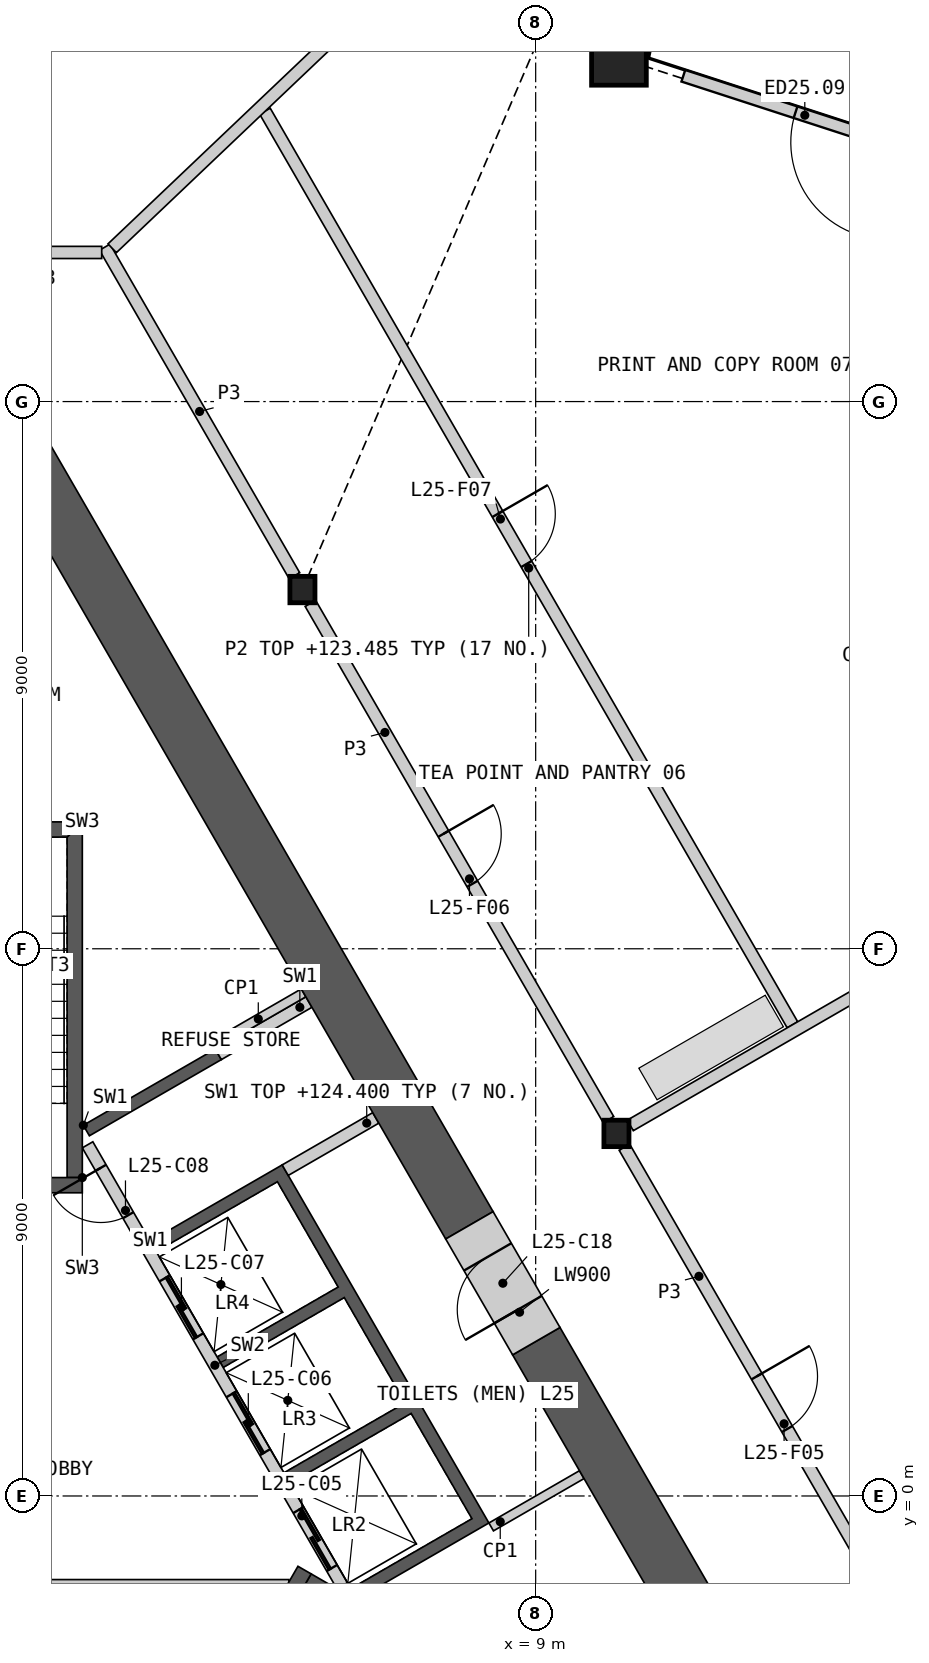
"""IFC4 building model, lengths in metres.
Left out: names, types, materials, properties, quantities, classifications, styles, units other than length and angle.
Written with IfcOpenShell. Run it as: python <this file> out.ifc"""

import sys

from ifc_helpers import new_model, si_unit, direction, frame, frame_2d, origin, origin_2d, place, context, subcontext, project, spatial, polyline, rectangle, hollow_rectangle, i_section, outline, extrude, element, fill, save


model = new_model("IFC4")
c1 = context("Model", 3, precision=1e-05, world=origin(), true_north=direction((0.0, 1.0)))
c2 = subcontext(c1, "Body", "Model", "MODEL_VIEW")
j1 = project(units=[si_unit("LENGTHUNIT", "METRE"), si_unit("PLANEANGLEUNIT", "RADIAN")], contexts=[c1])
p1 = place(None, origin())
s1 = spatial("IfcSite", under=j1, at=p1, CompositionType="ELEMENT")
p2 = place(p1, origin())
s2 = spatial("IfcBuilding", under=s1, at=p2, CompositionType="ELEMENT")
p3 = place(p2, frame((0.0, 0.0, 120.6)))
s3 = spatial("IfcBuildingStorey", under=s2, at=p3, CompositionType="ELEMENT", Elevation=120.6)
p4 = place(p3, frame((10.37, 23.654, 0.0), z_axis=(0.0, 0.0, 1.0), x_axis=(1.0, 0.0, 0.0)))
e1 = element("IfcColumn", 1, at=p4, inside=s3, PredefinedType="COLUMN", context=c2, shape_type="SweptSolid", body=[
    extrude(hollow_rectangle(XDim=0.9, YDim=0.9, WallThickness=0.06, at=origin_2d()), origin(), (0.0, 0.0, 1.0), 4.2),
])
for number, where, z_axis, x_axis in (
    (2, (10.328, 5.963, 0.0), (0.0, 0.0, 1.0), (1.0, 0.0, 0.0)),
    (3, (5.164, 14.908, 0.0), (0.0, 0.0, 1.0), (1.0, 0.0, 0.0)),
):
    element("IfcColumn", number, at=place(p3, frame(where, z_axis=z_axis, x_axis=x_axis)), inside=s3, PredefinedType="COLUMN", context=c2, shape_type="SweptSolid", body=[
        extrude(i_section(OverallWidth=0.412, OverallDepth=0.435, WebThickness=0.036, FlangeThickness=0.057, at=origin_2d()), origin(), (0.0, 0.0, 1.0), 4.2),
    ])
p5 = place(p3, frame((16.641, 21.665, 0.0), z_axis=(0.0, 0.0, 1.0), x_axis=(-0.951052727247, 0.309028655624, 0.0)))
e4 = element("IfcWall", 4, at=p5, inside=s3, PredefinedType="SOLIDWALL", context=c2, shape_type="SweptSolid", body=[
    extrude(rectangle(XDim=5.48, YDim=0.2, at=frame_2d((2.74, 0.0))), origin(), (0.0, 0.0, 1.0), 3.189),
])
p6 = place(p5, frame((1.94, 0.0, 0.0)))
e5 = element("IfcOpeningElement", 5, at=p6, cuts=e4, PredefinedType="OPENING", context=c2, shape_type="SweptSolid", body=[
    extrude(rectangle(XDim=1.6, YDim=2.4, at=frame_2d((0.8, 1.2))), frame((0.0, 0.11, 0.0), z_axis=(0.0, -1.0, 0.0), x_axis=(1.0, 0.0, 0.0)), (0.0, 0.0, 1.0), 0.22),
])
p7 = place(p3, origin())
e6 = element("IfcWall", 6, at=p7, inside=s3, PredefinedType="SHEAR", context=c2, shape_type="SweptSolid", body=[
    extrude(outline(polyline([(1.561, 6.097), (3.731, 7.35), (3.831, 7.177), (1.66, 5.924), (1.561, 6.097)])), origin(), (0.0, 0.0, 1.0), 3.8),
])
p8 = place(p3, origin())
e7 = element("IfcWall", 7, at=p8, inside=s3, PredefinedType="SHEAR", context=c2, shape_type="SweptSolid", body=[
    extrude(outline(polyline([(2.66, 4.192), (4.831, 5.445), (8.231, -0.444), (6.061, -1.697), (5.96, -1.524), (7.952, -0.374), (6.952, 1.358), (4.96, 0.208), (4.861, 0.381), (6.852, 1.531), (5.852, 3.263), (3.861, 2.113), (3.76, 2.287), (5.752, 3.437), (4.752, 5.169), (2.76, 4.019), (2.66, 4.192)])), origin(), (0.0, 0.0, 1.0), 3.8),
])
p9 = place(p3, frame((5.817, -1.476, 0.0), z_axis=(0.0, 0.0, 1.0), x_axis=(-0.500002616675, 0.866023893041, 0.0)))
e8 = element("IfcWall", 8, at=p9, inside=s3, PredefinedType="SOLIDWALL", context=c2, shape_type="SweptSolid", body=[
    extrude(rectangle(XDim=8.373, YDim=0.2, at=frame_2d((4.187, 0.0))), origin(), (0.0, 0.0, 1.0), 3.8),
])
p10 = place(p9, frame((0.337, 0.0, 0.0)))
e9 = element("IfcOpeningElement", 9, at=p10, cuts=e8, PredefinedType="OPENING", context=c2, shape_type="SweptSolid", body=[
    extrude(rectangle(XDim=1.1, YDim=2.1, at=frame_2d((0.55, 1.05))), frame((0.0, 0.11, 0.0), z_axis=(0.0, -1.0, 0.0), x_axis=(1.0, 0.0, 0.0)), (0.0, 0.0, 1.0), 0.22),
])
p11 = place(p9, frame((2.537, 0.0, 0.0)))
e10 = element("IfcOpeningElement", 10, at=p11, cuts=e8, PredefinedType="OPENING", context=c2, shape_type="SweptSolid", body=[
    extrude(rectangle(XDim=1.1, YDim=2.1, at=frame_2d((0.55, 1.05))), frame((0.0, 0.11, 0.0), z_axis=(0.0, -1.0, 0.0), x_axis=(1.0, 0.0, 0.0)), (0.0, 0.0, 1.0), 0.22),
])
p12 = place(p9, frame((4.737, 0.0, 0.0)))
e11 = element("IfcOpeningElement", 11, at=p12, cuts=e8, PredefinedType="OPENING", context=c2, shape_type="SweptSolid", body=[
    extrude(rectangle(XDim=1.1, YDim=2.1, at=frame_2d((0.55, 1.05))), frame((0.0, 0.11, 0.0), z_axis=(0.0, -1.0, 0.0), x_axis=(1.0, 0.0, 0.0)), (0.0, 0.0, 1.0), 0.22),
])
p13 = place(p9, frame((7.037, 0.0, 0.0)))
e12 = element("IfcOpeningElement", 12, at=p13, cuts=e8, PredefinedType="OPENING", context=c2, shape_type="SweptSolid", body=[
    extrude(rectangle(XDim=0.9, YDim=2.1, at=frame_2d((0.45, 1.05))), frame((0.0, 0.11, 0.0), z_axis=(0.0, -1.0, 0.0), x_axis=(1.0, 0.0, 0.0)), (0.0, 0.0, 1.0), 0.22),
])
for number, where, z_axis, x_axis in (
    (13, (4.881, 5.358, 0.0), (0.0, 0.0, 1.0), (0.866, 0.5, 0.0)),
    (14, (3.781, 7.263, 0.0), (0.0, 0.0, 1.0), (0.866, 0.5, 0.0)),
):
    element("IfcWall", number, at=place(p3, frame(where, z_axis=z_axis, x_axis=x_axis)), inside=s3, PredefinedType="SHEAR", context=c2, shape_type="SweptSolid", body=[
        extrude(rectangle(XDim=1.72, YDim=0.2, at=frame_2d((0.86, 0.0))), origin(), (0.0, 0.0, 1.0), 3.8),
    ])
p14 = place(p3, frame((-4.941, -1.45, 0.0), z_axis=(0.0, 0.0, 1.0), x_axis=(1.0, 0.0, 0.0)))
e15 = element("IfcWall", 15, at=p14, inside=s3, PredefinedType="PARTITIONING", context=c2, shape_type="SweptSolid", body=[
    extrude(rectangle(XDim=9.882, YDim=0.15, at=frame_2d((4.941, 0.0))), origin(), (0.0, 0.0, 1.0), 3.8),
])
p15 = place(p14, frame((4.391, 0.0, 0.0)))
e16 = element("IfcOpeningElement", 16, at=p15, cuts=e15, PredefinedType="OPENING", context=c2, shape_type="SweptSolid", body=[
    extrude(rectangle(XDim=1.1, YDim=2.1, at=frame_2d((0.55, 1.05))), frame((0.0, 0.085, 0.0), z_axis=(0.0, -1.0, 0.0), x_axis=(1.0, 0.0, 0.0)), (0.0, 0.0, 1.0), 0.17),
])
p16 = place(p3, origin())
e17 = element("IfcWall", 17, at=p16, inside=s3, PredefinedType="SHEAR", context=c2, shape_type="SweptSolid", body=[
    extrude(outline(polyline([(10.032, -4.298), (10.374, -4.206), (5.307, -1.281), (5.182, -1.498), (10.032, -4.298)])), origin(), (0.0, 0.0, 1.0), 3.8),
])
p17 = place(p3, frame((3.655, -3.893, 0.0), z_axis=(0.0, 0.0, 1.0), x_axis=(0.499982516597, 0.866035497597, 0.0)))
e18 = element("IfcWall", 18, at=p17, inside=s3, PredefinedType="SHEAR", context=c2, shape_type="SweptSolid", body=[
    extrude(rectangle(XDim=3.088, YDim=0.25, at=frame_2d((1.544, 0.0))), origin(), (0.0, 0.0, 1.0), 3.8),
])
p18 = place(p17, frame((0.994, 0.0, 0.0)))
e19 = element("IfcOpeningElement", 19, at=p18, cuts=e18, PredefinedType="OPENING", context=c2, shape_type="SweptSolid", body=[
    extrude(rectangle(XDim=1.1, YDim=2.1, at=frame_2d((0.55, 1.05))), frame((0.0, 0.135, 0.0), z_axis=(0.0, -1.0, 0.0), x_axis=(1.0, 0.0, 0.0)), (0.0, 0.0, 1.0), 0.27),
])
p19 = place(p3, origin())
e20 = element("IfcWall", 20, at=p19, inside=s3, PredefinedType="SHEAR", context=c2, shape_type="SweptSolid", body=[
    extrude(outline(polyline([(1.544, 5.237), (1.544, 11.087), (1.294, 10.837), (1.294, 5.237), (1.544, 5.237)])), origin(), (0.0, 0.0, 1.0), 3.8),
])
p20 = place(p3, origin())
e21 = element("IfcWall", 21, at=p20, inside=s3, PredefinedType="SHEAR", context=c2, shape_type="SweptSolid", body=[
    extrude(outline(polyline([(1.544, 11.087), (-1.544, 11.087), (-1.294, 10.837), (1.294, 10.837), (1.544, 11.087)])), origin(), (0.0, 0.0, 1.0), 3.8),
])
p21 = place(p3, frame((1.544, 5.112, 0.0), z_axis=(0.0, 0.0, 1.0), x_axis=(-1.0, 0.0, 0.0)))
e22 = element("IfcWall", 22, at=p21, inside=s3, PredefinedType="SHEAR", context=c2, shape_type="SweptSolid", body=[
    extrude(rectangle(XDim=3.088, YDim=0.25, at=frame_2d((1.544, 0.0))), origin(), (0.0, 0.0, 1.0), 3.8),
])
p22 = place(p21, frame((0.994, 0.0, 0.0)))
e23 = element("IfcOpeningElement", 23, at=p22, cuts=e22, PredefinedType="OPENING", context=c2, shape_type="SweptSolid", body=[
    extrude(rectangle(XDim=1.1, YDim=2.1, at=frame_2d((0.55, 1.05))), frame((0.0, 0.135, 0.0), z_axis=(0.0, -1.0, 0.0), x_axis=(1.0, 0.0, 0.0)), (0.0, 0.0, 1.0), 0.27),
])
for number, where, z_axis, x_axis in (
    (24, (3.693, 7.415, 0.0), (0.0, 0.0, 1.0), (0.866, 0.5, 0.0)),
    (25, (8.268, -0.509, 0.0), (0.0, 0.0, 1.0), (0.866, 0.5, 0.0)),
):
    element("IfcWall", number, at=place(p3, frame(where, z_axis=z_axis, x_axis=x_axis)), inside=s3, PredefinedType="PARTITIONING", context=c2, shape_type="SweptSolid", body=[
        extrude(rectangle(XDim=1.72, YDim=0.15, at=frame_2d((0.86, 0.0))), origin(), (0.0, 0.0, 1.0), 3.8),
    ])
p23 = place(p3, frame((7.91, 4.451, 0.0), z_axis=(0.0, 0.0, 1.0), x_axis=(-0.500005799286, 0.866022055539, 0.0)))
e26 = element("IfcWall", 26, at=p23, inside=s3, PredefinedType="SHEAR", context=c2, shape_type="SweptSolid", body=[
    extrude(rectangle(XDim=15.041, YDim=0.9, at=frame_2d((7.521, 0.0))), origin(), (0.0, 0.0, 1.0), 3.8),
])
p24 = place(p3, frame((15.331, -8.401, 0.0), z_axis=(0.0, 0.0, 1.0), x_axis=(-0.49999216708, 0.866029926076, 0.0)))
e27 = element("IfcWall", 27, at=p24, inside=s3, PredefinedType="SHEAR", context=c2, shape_type="SweptSolid", body=[
    extrude(rectangle(XDim=12.641, YDim=0.9, at=frame_2d((6.321, 0.0))), origin(), (0.0, 0.0, 1.0), 3.8),
])
p25 = place(p3, frame((9.01, 2.546, 0.0), z_axis=(0.0, 0.0, 1.0), x_axis=(-0.499994660107, 0.866028486751, 0.0)))
e28 = element("IfcWall", 28, at=p25, inside=s3, PredefinedType="SHEAR", context=c2, shape_type="SweptSolid", body=[
    extrude(rectangle(XDim=2.2, YDim=0.9, at=frame_2d((1.1, 0.0))), origin(), (0.0, 0.0, 1.0), 3.8),
])
p26 = place(p25, frame((0.6, 0.0, 0.0)))
e29 = element("IfcOpeningElement", 29, at=p26, cuts=e28, PredefinedType="OPENING", context=c2, shape_type="SweptSolid", body=[
    extrude(rectangle(XDim=1.0, YDim=2.1, at=frame_2d((0.5, 1.05))), frame((0.0, 0.46, 0.0), z_axis=(0.0, -1.0, 0.0), x_axis=(1.0, 0.0, 0.0)), (0.0, 0.0, 1.0), 0.92),
])
p27 = place(p3, frame((10.46, 5.736, 0.0), z_axis=(0.0, 0.0, 1.0), x_axis=(0.500004141693, -0.866023012564, 0.0)))
e30 = element("IfcWall", 30, at=p27, inside=s3, PredefinedType="PARTITIONING", context=c2, shape_type="SweptSolid", body=[
    extrude(rectangle(XDim=9.803, YDim=0.2, at=frame_2d((4.902, 0.0))), origin(), (0.0, 0.0, 1.0), 3.8),
])
p28 = place(p27, frame((4.352, 0.0, 0.0)))
e31 = element("IfcOpeningElement", 31, at=p28, cuts=e30, PredefinedType="OPENING", context=c2, shape_type="SweptSolid", body=[
    extrude(rectangle(XDim=1.0, YDim=2.1, at=frame_2d((0.5, 1.05))), frame((0.0, 0.11, 0.0), z_axis=(0.0, -1.0, 0.0), x_axis=(1.0, 0.0, 0.0)), (0.0, 0.0, 1.0), 0.22),
])
p29 = place(p3, frame((5.295, 14.68, 0.0), z_axis=(0.0, 0.0, 1.0), x_axis=(0.500012035596, -0.866018454918, 0.0)))
e32 = element("IfcWall", 32, at=p29, inside=s3, PredefinedType="PARTITIONING", context=c2, shape_type="SweptSolid", body=[
    extrude(rectangle(XDim=9.803, YDim=0.2, at=frame_2d((4.902, 0.0))), origin(), (0.0, 0.0, 1.0), 3.8),
])
p30 = place(p29, frame((4.376, 0.0, 0.0)))
e33 = element("IfcOpeningElement", 33, at=p30, cuts=e32, PredefinedType="OPENING", context=c2, shape_type="SweptSolid", body=[
    extrude(rectangle(XDim=0.95, YDim=2.1, at=frame_2d((0.475, 1.05))), frame((0.0, 0.11, 0.0), z_axis=(0.0, -1.0, 0.0), x_axis=(1.0, 0.0, 0.0)), (0.0, 0.0, 1.0), 0.22),
])
p31 = place(p3, frame((1.913, 20.539, 0.0), z_axis=(0.0, 0.0, 1.0), x_axis=(0.499980978912, -0.866036385336, 0.0)))
e34 = element("IfcWall", 34, at=p31, inside=s3, PredefinedType="PARTITIONING", context=c2, shape_type="SweptSolid", body=[
    extrude(rectangle(XDim=6.24, YDim=0.2, at=frame_2d((3.12, 0.0))), origin(), (0.0, 0.0, 1.0), 3.8),
])
p32 = place(p3, frame((-1.863, 20.453, 0.0), z_axis=(0.0, 0.0, 1.0), x_axis=(1.0, 0.0, 0.0)))
e35 = element("IfcWall", 35, at=p32, inside=s3, PredefinedType="PARTITIONING", context=c2, shape_type="SweptSolid", body=[
    extrude(rectangle(XDim=3.726, YDim=0.2, at=frame_2d((1.863, 0.0))), origin(), (0.0, 0.0, 1.0), 3.8),
])
p33 = place(p32, frame((0.963, 0.0, 0.0)))
e36 = element("IfcOpeningElement", 36, at=p33, cuts=e35, PredefinedType="OPENING", context=c2, shape_type="SweptSolid", body=[
    extrude(rectangle(XDim=1.8, YDim=2.1, at=frame_2d((0.9, 1.05))), frame((0.0, 0.11, 0.0), z_axis=(0.0, -1.0, 0.0), x_axis=(1.0, 0.0, 0.0)), (0.0, 0.0, 1.0), 0.22),
])
p34 = place(p3, frame((4.548, 22.775, 0.0), z_axis=(0.0, 0.0, 1.0), x_axis=(0.499999764473, -0.866025539766, 0.0)))
e37 = element("IfcWall", 37, at=p34, inside=s3, PredefinedType="PARTITIONING", context=c2, shape_type="SweptSolid", body=[
    extrude(rectangle(XDim=17.35, YDim=0.2, at=frame_2d((8.675, 0.0))), origin(), (0.0, 0.0, 1.0), 2.885),
])
p35 = place(p34, frame((7.65, 0.0, 0.0)))
e38 = element("IfcOpeningElement", 38, at=p35, cuts=e37, PredefinedType="OPENING", context=c2, shape_type="SweptSolid", body=[
    extrude(rectangle(XDim=0.95, YDim=2.1, at=frame_2d((0.475, 1.05))), frame((0.0, 0.11, 0.0), z_axis=(0.0, -1.0, 0.0), x_axis=(1.0, 0.0, 0.0)), (0.0, 0.0, 1.0), 0.22),
])
p36 = place(p3, frame((2.035, 20.521, 0.0), z_axis=(0.0, 0.0, 1.0), x_axis=(0.724819524984, 0.688938789881, 0.0)))
e39 = element("IfcWall", 39, at=p36, inside=s3, PredefinedType="PARTITIONING", context=c2, shape_type="SweptSolid", body=[
    extrude(rectangle(XDim=13.622, YDim=0.2, at=frame_2d((6.811, 0.0))), origin(), (0.0, 0.0, 1.0), 2.885),
])
p37 = place(p3, frame((10.556, 6.094, 0.0), z_axis=(0.0, 0.0, 1.0), x_axis=(0.86602461759, 0.500001361726, 0.0)))
e40 = element("IfcWall", 40, at=p37, inside=s3, PredefinedType="PARTITIONING", context=c2, shape_type="SweptSolid", body=[
    extrude(rectangle(XDim=12.679, YDim=0.2, at=frame_2d((6.34, 0.0))), origin(), (0.0, 0.0, 1.0), 2.885),
])
p38 = place(p6, origin())
e41 = element("IfcDoor", 41, at=p38, inside=s3, OperationType="DOUBLE_DOOR_SINGLE_SWING", PredefinedType="DOOR", context=c2, shape_type="SweptSolid", body=[
    extrude(rectangle(XDim=1.6, YDim=2.4, at=frame_2d((0.8, 1.2))), frame((0.0, 0.025, 0.0), z_axis=(0.0, -1.0, 0.0), x_axis=(1.0, 0.0, 0.0)), (0.0, 0.0, 1.0), 0.05),
])
fill(e5, e41)
p39 = place(p10, origin())
e42 = element("IfcDoor", 42, at=p39, inside=s3, OperationType="SLIDING_TO_LEFT", PredefinedType="DOOR", context=c2, shape_type="SweptSolid", body=[
    extrude(rectangle(XDim=1.1, YDim=2.1, at=frame_2d((0.55, 1.05))), frame((0.0, 0.025, 0.0), z_axis=(0.0, -1.0, 0.0), x_axis=(1.0, 0.0, 0.0)), (0.0, 0.0, 1.0), 0.05),
])
fill(e9, e42)
p40 = place(p11, origin())
e43 = element("IfcDoor", 43, at=p40, inside=s3, OperationType="SLIDING_TO_LEFT", PredefinedType="DOOR", context=c2, shape_type="SweptSolid", body=[
    extrude(rectangle(XDim=1.1, YDim=2.1, at=frame_2d((0.55, 1.05))), frame((0.0, 0.025, 0.0), z_axis=(0.0, -1.0, 0.0), x_axis=(1.0, 0.0, 0.0)), (0.0, 0.0, 1.0), 0.05),
])
fill(e10, e43)
p41 = place(p12, origin())
e44 = element("IfcDoor", 44, at=p41, inside=s3, OperationType="SLIDING_TO_LEFT", PredefinedType="DOOR", context=c2, shape_type="SweptSolid", body=[
    extrude(rectangle(XDim=1.1, YDim=2.1, at=frame_2d((0.55, 1.05))), frame((0.0, 0.025, 0.0), z_axis=(0.0, -1.0, 0.0), x_axis=(1.0, 0.0, 0.0)), (0.0, 0.0, 1.0), 0.05),
])
fill(e11, e44)
p42 = place(p13, origin())
e45 = element("IfcDoor", 45, at=p42, inside=s3, OperationType="SINGLE_SWING_RIGHT", PredefinedType="DOOR", context=c2, shape_type="SweptSolid", body=[
    extrude(rectangle(XDim=0.9, YDim=2.1, at=frame_2d((0.45, 1.05))), frame((0.0, 0.025, 0.0), z_axis=(0.0, -1.0, 0.0), x_axis=(1.0, 0.0, 0.0)), (0.0, 0.0, 1.0), 0.05),
])
fill(e12, e45)
p43 = place(p26, origin())
e46 = element("IfcDoor", 46, at=p43, inside=s3, OperationType="SINGLE_SWING_LEFT", PredefinedType="DOOR", context=c2, shape_type="SweptSolid", body=[
    extrude(rectangle(XDim=1.0, YDim=2.1, at=frame_2d((0.5, 1.05))), frame((0.0, 0.205, 0.0), z_axis=(0.0, -1.0, 0.0), x_axis=(1.0, 0.0, 0.0)), (0.0, 0.0, 1.0), 0.05),
])
fill(e29, e46)
p44 = place(p28, origin())
e47 = element("IfcDoor", 47, at=p44, inside=s3, OperationType="SINGLE_SWING_LEFT", PredefinedType="DOOR", context=c2, shape_type="SweptSolid", body=[
    extrude(rectangle(XDim=1.0, YDim=2.1, at=frame_2d((0.5, 1.05))), frame((0.0, 0.025, 0.0), z_axis=(0.0, -1.0, 0.0), x_axis=(1.0, 0.0, 0.0)), (0.0, 0.0, 1.0), 0.05),
])
fill(e31, e47)
p45 = place(p30, origin())
e48 = element("IfcDoor", 48, at=p45, inside=s3, OperationType="SINGLE_SWING_LEFT", PredefinedType="DOOR", context=c2, shape_type="SweptSolid", body=[
    extrude(rectangle(XDim=0.95, YDim=2.1, at=frame_2d((0.475, 1.05))), frame((0.0, 0.025, 0.0), z_axis=(0.0, -1.0, 0.0), x_axis=(1.0, 0.0, 0.0)), (0.0, 0.0, 1.0), 0.05),
])
fill(e33, e48)
p46 = place(p35, origin())
e49 = element("IfcDoor", 49, at=p46, inside=s3, OperationType="SINGLE_SWING_LEFT", PredefinedType="DOOR", context=c2, shape_type="SweptSolid", body=[
    extrude(rectangle(XDim=0.95, YDim=2.1, at=frame_2d((0.475, 1.05))), frame((0.0, 0.025, 0.0), z_axis=(0.0, -1.0, 0.0), x_axis=(1.0, 0.0, 0.0)), (0.0, 0.0, 1.0), 0.05),
])
fill(e38, e49)
save(model, sys.argv[1])
